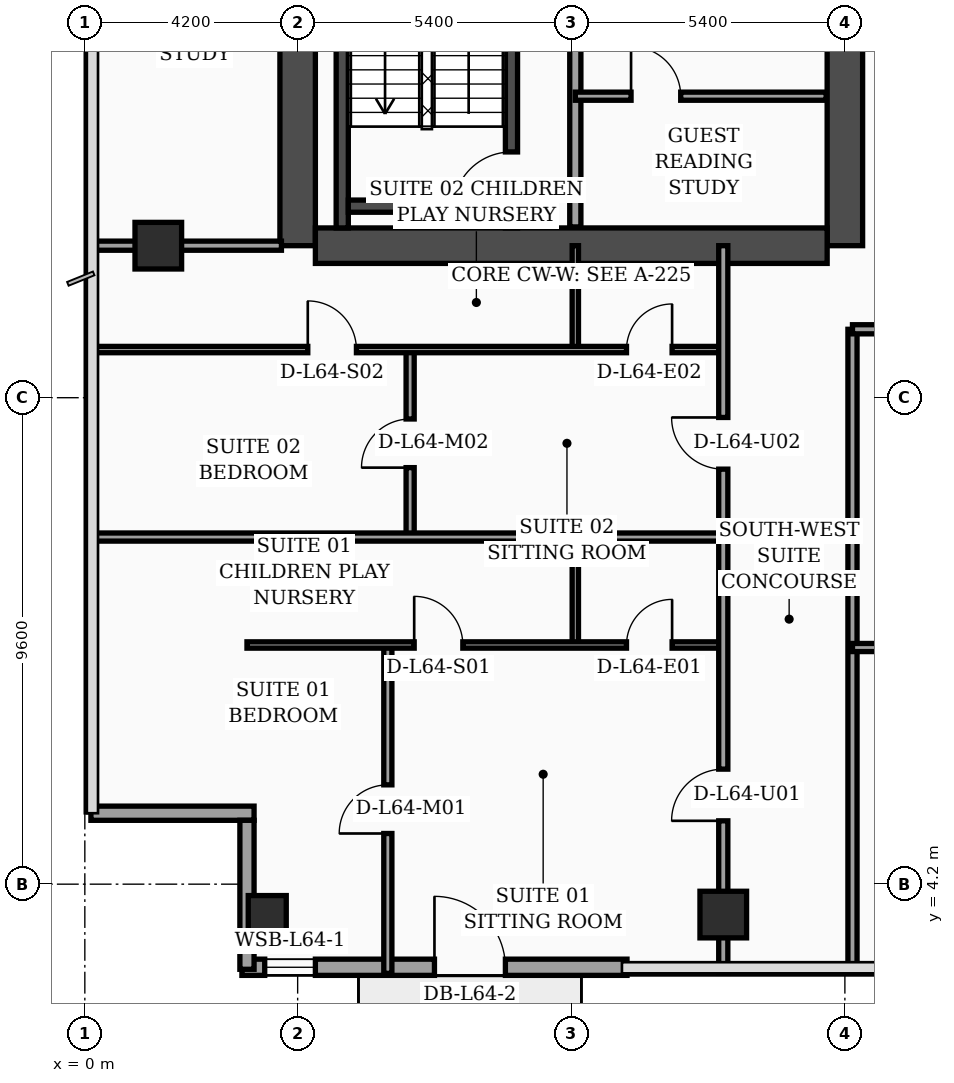
"""IFC4 building model, lengths in metres.
Left out: names, types, materials, properties, quantities, classifications, styles, units other than length and angle.
Written with IfcOpenShell. Run it as: python <this file> out.ifc"""

import sys

from ifc_helpers import new_model, si_unit, direction, frame, frame_2d, origin, origin_2d, place, context, subcontext, project, spatial, rectangle, hollow_rectangle, extrude, element, fill, save


model = new_model("IFC4")
c1 = context("Model", 3, precision=1e-05, world=origin(), true_north=direction((0.0, 1.0)))
c2 = subcontext(c1, "Body", "Model", "MODEL_VIEW")
j1 = project(units=[si_unit("LENGTHUNIT", "METRE"), si_unit("PLANEANGLEUNIT", "RADIAN")], contexts=[c1])
p1 = place(None, origin())
s1 = spatial("IfcSite", under=j1, at=p1, CompositionType="ELEMENT")
p2 = place(p1, origin())
s2 = spatial("IfcBuilding", under=s1, at=p2, CompositionType="ELEMENT")
p3 = place(p2, frame((0.0, 0.0, 259.0)))
s3 = spatial("IfcBuildingStorey", under=s2, at=p3, CompositionType="ELEMENT", Elevation=259.0)
p4 = place(p3, frame((4.2, 16.8, 0.0), z_axis=(0.0, 0.0, 1.0), x_axis=(0.0, 1.0, 0.0)))
e1 = element("IfcWall", 1, at=p4, inside=s3, PredefinedType="SHEAR", context=c2, shape_type="SweptSolid", body=[
    extrude(rectangle(XDim=21.6, YDim=0.7, at=frame_2d((10.8, 0.0))), origin(), (0.0, 0.0, 1.0), 4.05),
])
p5 = place(p3, frame((15.0, 16.8, 0.0), z_axis=(0.0, 0.0, 1.0), x_axis=(0.0, 1.0, 0.0)))
e2 = element("IfcWall", 2, at=p5, inside=s3, PredefinedType="SHEAR", context=c2, shape_type="SweptSolid", body=[
    extrude(rectangle(XDim=21.6, YDim=0.7, at=frame_2d((10.8, 0.0))), origin(), (0.0, 0.0, 1.0), 4.05),
])
p6 = place(p5, frame((8.65, 0.0, 0.0)))
e3 = element("IfcOpeningElement", 3, at=p6, cuts=e2, PredefinedType="OPENING", context=c2, shape_type="SweptSolid", body=[
    extrude(rectangle(XDim=1.1, YDim=2.2, at=frame_2d((0.55, 1.1))), frame((0.0, 0.36, 0.0), z_axis=(0.0, -1.0, 0.0), x_axis=(1.0, 0.0, 0.0)), (0.0, 0.0, 1.0), 0.72),
])
p7 = place(p5, frame((18.9, 0.0, 0.0)))
e4 = element("IfcOpeningElement", 4, at=p7, cuts=e2, PredefinedType="OPENING", context=c2, shape_type="SweptSolid", body=[
    extrude(rectangle(XDim=1.1, YDim=2.2, at=frame_2d((0.55, 1.1))), frame((0.0, 0.36, 0.0), z_axis=(0.0, -1.0, 0.0), x_axis=(1.0, 0.0, 0.0)), (0.0, 0.0, 1.0), 0.72),
])
p8 = place(p3, frame((4.55, 16.8, 0.0), z_axis=(0.0, 0.0, 1.0), x_axis=(1.0, 0.0, 0.0)))
e5 = element("IfcWall", 5, at=p8, inside=s3, PredefinedType="SHEAR", context=c2, shape_type="SweptSolid", body=[
    extrude(rectangle(XDim=10.1, YDim=0.7, at=frame_2d((5.05, 0.0))), origin(), (0.0, 0.0, 1.0), 4.05),
])
p9 = place(p3, frame((5.08, 17.15, 0.0), z_axis=(0.0, 0.0, 1.0), x_axis=(0.0, 1.0, 0.0)))
e6 = element("IfcWall", 6, at=p9, inside=s3, PredefinedType="SOLIDWALL", context=c2, shape_type="SweptSolid", body=[
    extrude(rectangle(XDim=9.64, YDim=0.24, at=frame_2d((4.82, 0.0))), origin(), (0.0, 0.0, 1.0), 4.05),
])
p10 = place(p3, frame((8.42, 17.15, 0.0), z_axis=(0.0, 0.0, 1.0), x_axis=(0.0, 1.0, 0.0)))
e7 = element("IfcWall", 7, at=p10, inside=s3, PredefinedType="SOLIDWALL", context=c2, shape_type="SweptSolid", body=[
    extrude(rectangle(XDim=9.64, YDim=0.24, at=frame_2d((4.82, 0.0))), origin(), (0.0, 0.0, 1.0), 4.05),
])
p11 = place(p10, frame((0.35, 0.0, 0.0)))
e8 = element("IfcOpeningElement", 8, at=p11, cuts=e7, PredefinedType="OPENING", context=c2, shape_type="SweptSolid", body=[
    extrude(rectangle(XDim=1.15, YDim=2.2, at=frame_2d((0.575, 1.1))), frame((0.0, 0.13, 0.0), z_axis=(0.0, -1.0, 0.0), x_axis=(1.0, 0.0, 0.0)), (0.0, 0.0, 1.0), 0.26),
])
p12 = place(p3, frame((5.2, 17.58, 0.0), z_axis=(0.0, 0.0, 1.0), x_axis=(1.0, 0.0, 0.0)))
e9 = element("IfcWall", 9, at=p12, inside=s3, PredefinedType="SOLIDWALL", context=c2, shape_type="SweptSolid", body=[
    extrude(rectangle(XDim=3.1, YDim=0.24, at=frame_2d((1.55, 0.0))), origin(), (0.0, 0.0, 1.0), 4.05),
])
p13 = place(p3, frame((3.6, 3.6, 0.0), z_axis=(0.0, 0.0, 1.0), x_axis=(1.0, 0.0, 0.0)))
e10 = element("IfcColumn", 10, at=p13, inside=s3, PredefinedType="COLUMN", context=c2, shape_type="SweptSolid", body=[
    extrude(hollow_rectangle(XDim=0.75, YDim=0.75, WallThickness=0.032, at=origin_2d()), origin(), (0.0, 0.0, 1.0), 4.05),
])
for number, where, z_axis, x_axis in (
    (11, (1.45, 16.8, 0.0), (0.0, 0.0, 1.0), (1.0, 0.0, 0.0)),
    (12, (12.6, 3.6, 0.0), (0.0, 0.0, 1.0), (1.0, 0.0, 0.0)),
):
    element("IfcColumn", number, at=place(p3, frame(where, z_axis=z_axis, x_axis=x_axis)), inside=s3, PredefinedType="COLUMN", context=c2, shape_type="SweptSolid", body=[
        extrude(rectangle(XDim=0.92, YDim=0.92, at=origin_2d()), origin(), (0.0, 0.0, 1.0), 4.05),
    ])
p14 = place(p3, frame((3.1, 2.56, 0.0), z_axis=(0.0, 0.0, 1.0), x_axis=(1.0, 0.0, 0.0)))
e13 = element("IfcWall", 13, at=p14, inside=s3, PredefinedType="SOLIDWALL", context=c2, shape_type="SweptSolid", body=[
    extrude(rectangle(XDim=7.6, YDim=0.32, at=frame_2d((3.8, 0.0))), origin(), (0.0, 0.0, 1.0), 4.05),
])
p15 = place(p14, frame((0.45, 0.0, 0.75)))
e14 = element("IfcOpeningElement", 14, at=p15, cuts=e13, PredefinedType="OPENING", context=c2, shape_type="SweptSolid", body=[
    extrude(rectangle(XDim=1.0, YDim=1.6, at=frame_2d((0.5, 0.8))), frame((0.0, 0.17, 0.0), z_axis=(0.0, -1.0, 0.0), x_axis=(1.0, 0.0, 0.0)), (0.0, 0.0, 1.0), 0.34),
])
p16 = place(p14, frame((3.8, 0.0, 0.0)))
e15 = element("IfcOpeningElement", 15, at=p16, cuts=e13, PredefinedType="OPENING", context=c2, shape_type="SweptSolid", body=[
    extrude(rectangle(XDim=1.4, YDim=2.25, at=frame_2d((0.7, 1.125))), frame((0.0, 0.17, 0.0), z_axis=(0.0, -1.0, 0.0), x_axis=(1.0, 0.0, 0.0)), (0.0, 0.0, 1.0), 0.34),
])
p17 = place(p3, frame((0.12, 5.6, 0.0), z_axis=(0.0, 0.0, 1.0), x_axis=(1.0, 0.0, 0.0)))
e16 = element("IfcWall", 16, at=p17, inside=s3, PredefinedType="SOLIDWALL", context=c2, shape_type="SweptSolid", body=[
    extrude(rectangle(XDim=3.22, YDim=0.28, at=frame_2d((1.61, 0.0))), origin(), (0.0, 0.0, 1.0), 3.5),
])
p18 = place(p3, frame((3.2, 5.46, 0.0), z_axis=(0.0, 0.0, 1.0), x_axis=(0.0, -1.0, 0.0)))
e17 = element("IfcWall", 17, at=p18, inside=s3, PredefinedType="SOLIDWALL", context=c2, shape_type="SweptSolid", body=[
    extrude(rectangle(XDim=2.94, YDim=0.28, at=frame_2d((1.47, 0.0))), origin(), (0.0, 0.0, 1.0), 2.35),
])
p19 = place(p3, frame((9.68, 17.17, 0.0), z_axis=(0.0, 0.0, 1.0), x_axis=(0.0, 1.0, 0.0)))
e18 = element("IfcWall", 18, at=p19, inside=s3, PredefinedType="SOLIDWALL", context=c2, shape_type="SweptSolid", body=[
    extrude(rectangle(XDim=7.83, YDim=0.22, at=frame_2d((3.915, 0.0))), origin(), (0.0, 0.0, 1.0), 4.05),
])
p20 = place(p3, frame((9.68, 19.75, 0.0), z_axis=(0.0, 0.0, 1.0), x_axis=(1.0, 0.0, 0.0)))
e19 = element("IfcWall", 19, at=p20, inside=s3, PredefinedType="PARTITIONING", context=c2, shape_type="SweptSolid", body=[
    extrude(rectangle(XDim=4.95, YDim=0.16, at=frame_2d((2.475, 0.0))), origin(), (0.0, 0.0, 1.0), 4.05),
])
p21 = place(p20, frame((1.1, 0.0, 0.0)))
e20 = element("IfcOpeningElement", 20, at=p21, cuts=e19, PredefinedType="OPENING", context=c2, shape_type="SweptSolid", body=[
    extrude(rectangle(XDim=0.98, YDim=2.15, at=frame_2d((0.49, 1.075))), frame((0.0, 0.09, 0.0), z_axis=(0.0, -1.0, 0.0), x_axis=(1.0, 0.0, 0.0)), (0.0, 0.0, 1.0), 0.18),
])
p22 = place(p3, frame((0.08, 16.8, 0.0), z_axis=(0.0, 0.0, 1.0), x_axis=(1.0, 0.0, 0.0)))
e21 = element("IfcWall", 21, at=p22, inside=s3, PredefinedType="PARTITIONING", context=c2, shape_type="SweptSolid", body=[
    extrude(rectangle(XDim=3.8, YDim=0.18, at=frame_2d((1.9, 0.0))), origin(), (0.0, 0.0, 1.0), 3.5),
])
p23 = place(p3, frame((9.68, 8.92, 0.0), z_axis=(0.0, 0.0, 1.0), x_axis=(0.0, 1.0, 0.0)))
e22 = element("IfcWall", 22, at=p23, inside=s3, PredefinedType="PARTITIONING", context=c2, shape_type="SweptSolid", body=[
    extrude(rectangle(XDim=2.13, YDim=0.125, at=frame_2d((1.065, 0.0))), origin(), (0.0, 0.0, 1.0), 3.6),
])
p24 = place(p3, frame((5.98, 2.44, 0.0), z_axis=(0.0, 0.0, 1.0), x_axis=(0.0, 1.0, 0.0)))
e23 = element("IfcWall", 23, at=p24, inside=s3, PredefinedType="PARTITIONING", context=c2, shape_type="SweptSolid", body=[
    extrude(rectangle(XDim=6.48, YDim=0.16, at=frame_2d((3.24, 0.0))), origin(), (0.0, 0.0, 1.0), 2.35),
])
p25 = place(p24, frame((2.76, 0.0, 0.0)))
e24 = element("IfcOpeningElement", 24, at=p25, cuts=e23, PredefinedType="OPENING", context=c2, shape_type="SweptSolid", body=[
    extrude(rectangle(XDim=0.96, YDim=2.2, at=frame_2d((0.48, 1.1))), frame((0.0, 0.09, 0.0), z_axis=(0.0, -1.0, 0.0), x_axis=(1.0, 0.0, 0.0)), (0.0, 0.0, 1.0), 0.18),
])
p26 = place(p3, frame((3.2, 8.92, 0.0), z_axis=(0.0, 0.0, 1.0), x_axis=(1.0, 0.0, 0.0)))
e25 = element("IfcWall", 25, at=p26, inside=s3, PredefinedType="PARTITIONING", context=c2, shape_type="SweptSolid", body=[
    extrude(rectangle(XDim=9.4, YDim=0.125, at=frame_2d((4.7, 0.0))), origin(), (0.0, 0.0, 1.0), 3.5),
])
p27 = place(p26, frame((3.3, 0.0, 0.0)))
e26 = element("IfcOpeningElement", 26, at=p27, cuts=e25, PredefinedType="OPENING", context=c2, shape_type="SweptSolid", body=[
    extrude(rectangle(XDim=0.96, YDim=2.2, at=frame_2d((0.48, 1.1))), frame((0.0, 0.073, 0.0), z_axis=(0.0, -1.0, 0.0), x_axis=(1.0, 0.0, 0.0)), (0.0, 0.0, 1.0), 0.145),
])
p28 = place(p26, frame((7.49, 0.0, 0.0)))
e27 = element("IfcOpeningElement", 27, at=p28, cuts=e25, PredefinedType="OPENING", context=c2, shape_type="SweptSolid", body=[
    extrude(rectangle(XDim=0.9, YDim=2.15, at=frame_2d((0.45, 1.075))), frame((0.0, 0.073, 0.0), z_axis=(0.0, -1.0, 0.0), x_axis=(1.0, 0.0, 0.0)), (0.0, 0.0, 1.0), 0.145),
])
p29 = place(p3, frame((9.68, 14.75, 0.0), z_axis=(0.0, 0.0, 1.0), x_axis=(0.0, 1.0, 0.0)))
e28 = element("IfcWall", 28, at=p29, inside=s3, PredefinedType="PARTITIONING", context=c2, shape_type="SweptSolid", body=[
    extrude(rectangle(XDim=2.05, YDim=0.125, at=frame_2d((1.025, 0.0))), origin(), (0.0, 0.0, 1.0), 4.05),
])
p30 = place(p3, frame((6.42, 11.05, 0.0), z_axis=(0.0, 0.0, 1.0), x_axis=(0.0, 1.0, 0.0)))
e29 = element("IfcWall", 29, at=p30, inside=s3, PredefinedType="PARTITIONING", context=c2, shape_type="SweptSolid", body=[
    extrude(rectangle(XDim=3.7, YDim=0.16, at=frame_2d((1.85, 0.0))), origin(), (0.0, 0.0, 1.0), 4.05),
])
p31 = place(p30, frame((1.37, 0.0, 0.0)))
e30 = element("IfcOpeningElement", 30, at=p31, cuts=e29, PredefinedType="OPENING", context=c2, shape_type="SweptSolid", body=[
    extrude(rectangle(XDim=0.96, YDim=2.2, at=frame_2d((0.48, 1.1))), frame((0.0, 0.09, 0.0), z_axis=(0.0, -1.0, 0.0), x_axis=(1.0, 0.0, 0.0)), (0.0, 0.0, 1.0), 0.18),
])
p32 = place(p3, frame((0.08, 14.75, 0.0), z_axis=(0.0, 0.0, 1.0), x_axis=(1.0, 0.0, 0.0)))
e31 = element("IfcWall", 31, at=p32, inside=s3, PredefinedType="PARTITIONING", context=c2, shape_type="SweptSolid", body=[
    extrude(rectangle(XDim=12.52, YDim=0.125, at=frame_2d((6.26, 0.0))), origin(), (0.0, 0.0, 1.0), 3.5),
])
p33 = place(p32, frame((4.32, 0.0, 0.0)))
e32 = element("IfcOpeningElement", 32, at=p33, cuts=e31, PredefinedType="OPENING", context=c2, shape_type="SweptSolid", body=[
    extrude(rectangle(XDim=0.96, YDim=2.2, at=frame_2d((0.48, 1.1))), frame((0.0, 0.073, 0.0), z_axis=(0.0, -1.0, 0.0), x_axis=(1.0, 0.0, 0.0)), (0.0, 0.0, 1.0), 0.145),
])
p34 = place(p32, frame((10.61, 0.0, 0.0)))
e33 = element("IfcOpeningElement", 33, at=p34, cuts=e31, PredefinedType="OPENING", context=c2, shape_type="SweptSolid", body=[
    extrude(rectangle(XDim=0.9, YDim=2.15, at=frame_2d((0.45, 1.075))), frame((0.0, 0.073, 0.0), z_axis=(0.0, -1.0, 0.0), x_axis=(1.0, 0.0, 0.0)), (0.0, 0.0, 1.0), 0.145),
])
p35 = place(p3, frame((0.08, 11.05, 0.0), z_axis=(0.0, 0.0, 1.0), x_axis=(1.0, 0.0, 0.0)))
e34 = element("IfcWall", 34, at=p35, inside=s3, PredefinedType="PARTITIONING", context=c2, shape_type="SweptSolid", body=[
    extrude(rectangle(XDim=12.52, YDim=0.16, at=frame_2d((6.26, 0.0))), origin(), (0.0, 0.0, 1.0), 3.5),
])
p36 = place(p3, frame((12.6, 2.44, 0.0), z_axis=(0.0, 0.0, 1.0), x_axis=(0.0, 1.0, 0.0)))
e35 = element("IfcWall", 35, at=p36, inside=s3, PredefinedType="PARTITIONING", context=c2, shape_type="SweptSolid", body=[
    extrude(rectangle(XDim=14.36, YDim=0.18, at=frame_2d((7.18, 0.0))), origin(), (0.0, 0.0, 1.0), 2.35),
])
p37 = place(p36, frame((3.01, 0.0, 0.0)))
e36 = element("IfcOpeningElement", 36, at=p37, cuts=e35, PredefinedType="OPENING", context=c2, shape_type="SweptSolid", body=[
    extrude(rectangle(XDim=1.02, YDim=2.2, at=frame_2d((0.51, 1.1))), frame((0.0, 0.1, 0.0), z_axis=(0.0, -1.0, 0.0), x_axis=(1.0, 0.0, 0.0)), (0.0, 0.0, 1.0), 0.2),
])
p38 = place(p36, frame((9.95, 0.0, 0.0)))
e37 = element("IfcOpeningElement", 37, at=p38, cuts=e35, PredefinedType="OPENING", context=c2, shape_type="SweptSolid", body=[
    extrude(rectangle(XDim=1.02, YDim=2.2, at=frame_2d((0.51, 1.1))), frame((0.0, 0.1, 0.0), z_axis=(0.0, -1.0, 0.0), x_axis=(1.0, 0.0, 0.0)), (0.0, 0.0, 1.0), 0.2),
])
p39 = place(p3, frame((15.15, 2.44, 0.0), z_axis=(0.0, 0.0, 1.0), x_axis=(0.0, 1.0, 0.0)))
e38 = element("IfcWall", 38, at=p39, inside=s3, PredefinedType="PARTITIONING", context=c2, shape_type="SweptSolid", body=[
    extrude(rectangle(XDim=12.71, YDim=0.18, at=frame_2d((6.355, 0.0))), origin(), (0.0, 0.0, 1.0), 2.35),
])
p40 = place(p3, frame((15.15, 8.87, 0.0), z_axis=(0.0, 0.0, 1.0), x_axis=(1.0, 0.0, 0.0)))
e39 = element("IfcWall", 39, at=p40, inside=s3, PredefinedType="PARTITIONING", context=c2, shape_type="SweptSolid", body=[
    extrude(rectangle(XDim=4.45, YDim=0.16, at=frame_2d((2.225, 0.0))), origin(), (0.0, 0.0, 1.0), 4.05),
])
p41 = place(p40, frame((1.75, 0.0, 0.0)))
e40 = element("IfcOpeningElement", 40, at=p41, cuts=e39, PredefinedType="OPENING", context=c2, shape_type="SweptSolid", body=[
    extrude(rectangle(XDim=0.96, YDim=2.2, at=frame_2d((0.48, 1.1))), frame((0.0, 0.09, 0.0), z_axis=(0.0, -1.0, 0.0), x_axis=(1.0, 0.0, 0.0)), (0.0, 0.0, 1.0), 0.18),
])
p42 = place(p3, frame((15.15, 15.15, 0.0), z_axis=(0.0, 0.0, 1.0), x_axis=(1.0, 0.0, 0.0)))
e41 = element("IfcWall", 41, at=p42, inside=s3, PredefinedType="PARTITIONING", context=c2, shape_type="SweptSolid", body=[
    extrude(rectangle(XDim=6.45, YDim=0.18, at=frame_2d((3.225, 0.0))), origin(), (0.0, 0.0, 1.0), 2.35),
])
p43 = place(p42, frame((1.74, 0.0, 0.0)))
e42 = element("IfcOpeningElement", 42, at=p43, cuts=e41, PredefinedType="OPENING", context=c2, shape_type="SweptSolid", body=[
    extrude(rectangle(XDim=1.02, YDim=2.2, at=frame_2d((0.51, 1.1))), frame((0.0, 0.1, 0.0), z_axis=(0.0, -1.0, 0.0), x_axis=(1.0, 0.0, 0.0)), (0.0, 0.0, 1.0), 0.2),
])
p44 = place(p15, origin())
e43 = element("IfcWindow", 43, at=p44, inside=s3, PartitioningType="SINGLE_PANEL", PredefinedType="WINDOW", context=c2, shape_type="SweptSolid", body=[
    extrude(rectangle(XDim=1.0, YDim=1.6, at=frame_2d((0.5, 0.8))), frame((0.0, 0.03, 0.0), z_axis=(0.0, -1.0, 0.0), x_axis=(1.0, 0.0, 0.0)), (0.0, 0.0, 1.0), 0.06),
])
fill(e14, e43)
p45 = place(p16, origin())
e44 = element("IfcDoor", 44, at=p45, inside=s3, OperationType="SINGLE_SWING_LEFT", PredefinedType="DOOR", context=c2, shape_type="SweptSolid", body=[
    extrude(rectangle(XDim=1.4, YDim=2.25, at=frame_2d((0.7, 1.125))), frame((0.0, 0.025, 0.0), z_axis=(0.0, -1.0, 0.0), x_axis=(1.0, 0.0, 0.0)), (0.0, 0.0, 1.0), 0.05),
])
fill(e15, e44)
p46 = place(p21, origin())
e45 = element("IfcDoor", 45, at=p46, inside=s3, OperationType="SINGLE_SWING_LEFT", PredefinedType="DOOR", context=c2, shape_type="SweptSolid", body=[
    extrude(rectangle(XDim=0.98, YDim=2.15, at=frame_2d((0.49, 1.075))), frame((0.0, 0.025, 0.0), z_axis=(0.0, -1.0, 0.0), x_axis=(1.0, 0.0, 0.0)), (0.0, 0.0, 1.0), 0.05),
])
fill(e20, e45)
p47 = place(p25, origin())
e46 = element("IfcDoor", 46, at=p47, inside=s3, OperationType="SINGLE_SWING_LEFT", PredefinedType="DOOR", context=c2, shape_type="SweptSolid", body=[
    extrude(rectangle(XDim=0.96, YDim=2.2, at=frame_2d((0.48, 1.1))), frame((0.0, 0.025, 0.0), z_axis=(0.0, -1.0, 0.0), x_axis=(1.0, 0.0, 0.0)), (0.0, 0.0, 1.0), 0.05),
])
fill(e24, e46)
p48 = place(p27, origin())
e47 = element("IfcDoor", 47, at=p48, inside=s3, OperationType="SINGLE_SWING_LEFT", PredefinedType="DOOR", context=c2, shape_type="SweptSolid", body=[
    extrude(rectangle(XDim=0.96, YDim=2.2, at=frame_2d((0.48, 1.1))), frame((0.0, 0.025, 0.0), z_axis=(0.0, -1.0, 0.0), x_axis=(1.0, 0.0, 0.0)), (0.0, 0.0, 1.0), 0.05),
])
fill(e26, e47)
p49 = place(p28, origin())
e48 = element("IfcDoor", 48, at=p49, inside=s3, OperationType="SINGLE_SWING_RIGHT", PredefinedType="DOOR", context=c2, shape_type="SweptSolid", body=[
    extrude(rectangle(XDim=0.9, YDim=2.15, at=frame_2d((0.45, 1.075))), frame((0.0, 0.025, 0.0), z_axis=(0.0, -1.0, 0.0), x_axis=(1.0, 0.0, 0.0)), (0.0, 0.0, 1.0), 0.05),
])
fill(e27, e48)
p50 = place(p31, origin())
e49 = element("IfcDoor", 49, at=p50, inside=s3, OperationType="SINGLE_SWING_LEFT", PredefinedType="DOOR", context=c2, shape_type="SweptSolid", body=[
    extrude(rectangle(XDim=0.96, YDim=2.2, at=frame_2d((0.48, 1.1))), frame((0.0, 0.025, 0.0), z_axis=(0.0, -1.0, 0.0), x_axis=(1.0, 0.0, 0.0)), (0.0, 0.0, 1.0), 0.05),
])
fill(e30, e49)
p51 = place(p33, origin())
e50 = element("IfcDoor", 50, at=p51, inside=s3, OperationType="SINGLE_SWING_LEFT", PredefinedType="DOOR", context=c2, shape_type="SweptSolid", body=[
    extrude(rectangle(XDim=0.96, YDim=2.2, at=frame_2d((0.48, 1.1))), frame((0.0, 0.025, 0.0), z_axis=(0.0, -1.0, 0.0), x_axis=(1.0, 0.0, 0.0)), (0.0, 0.0, 1.0), 0.05),
])
fill(e32, e50)
p52 = place(p34, origin())
e51 = element("IfcDoor", 51, at=p52, inside=s3, OperationType="SINGLE_SWING_RIGHT", PredefinedType="DOOR", context=c2, shape_type="SweptSolid", body=[
    extrude(rectangle(XDim=0.9, YDim=2.15, at=frame_2d((0.45, 1.075))), frame((0.0, 0.025, 0.0), z_axis=(0.0, -1.0, 0.0), x_axis=(1.0, 0.0, 0.0)), (0.0, 0.0, 1.0), 0.05),
])
fill(e33, e51)
p53 = place(p37, origin())
e52 = element("IfcDoor", 52, at=p53, inside=s3, OperationType="SINGLE_SWING_LEFT", PredefinedType="DOOR", context=c2, shape_type="SweptSolid", body=[
    extrude(rectangle(XDim=1.02, YDim=2.2, at=frame_2d((0.51, 1.1))), frame((0.0, 0.025, 0.0), z_axis=(0.0, -1.0, 0.0), x_axis=(1.0, 0.0, 0.0)), (0.0, 0.0, 1.0), 0.05),
])
fill(e36, e52)
p54 = place(p38, origin())
e53 = element("IfcDoor", 53, at=p54, inside=s3, OperationType="SINGLE_SWING_RIGHT", PredefinedType="DOOR", context=c2, shape_type="SweptSolid", body=[
    extrude(rectangle(XDim=1.02, YDim=2.2, at=frame_2d((0.51, 1.1))), frame((0.0, 0.025, 0.0), z_axis=(0.0, -1.0, 0.0), x_axis=(1.0, 0.0, 0.0)), (0.0, 0.0, 1.0), 0.05),
])
fill(e37, e53)
p55 = place(p11, origin())
e54 = element("IfcDoor", 54, at=p55, inside=s3, OperationType="SINGLE_SWING_LEFT", PredefinedType="DOOR", context=c2, shape_type="SweptSolid", body=[
    extrude(rectangle(XDim=1.15, YDim=2.2, at=frame_2d((0.575, 1.1))), frame((0.0, 0.025, 0.0), z_axis=(0.0, -1.0, 0.0), x_axis=(1.0, 0.0, 0.0)), (0.0, 0.0, 1.0), 0.05),
])
fill(e8, e54)
save(model, sys.argv[1])
